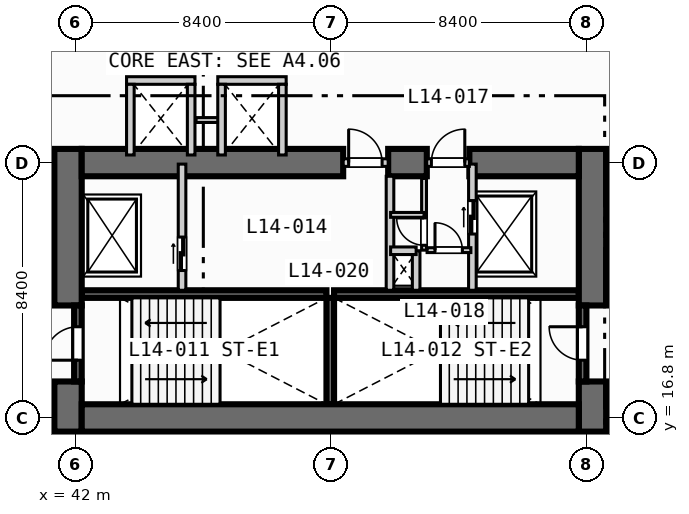
"""IFC4 building model, lengths in metres.
Left out: names, types, materials, properties, quantities, classifications, styles, units other than length and angle.
Written with IfcOpenShell. Run it as: python <this file> out.ifc"""

import sys

from ifc_helpers import new_model, si_unit, direction, frame, frame_2d, origin, place, context, subcontext, project, spatial, rectangle, extrude, element, fill, save


model = new_model("IFC4")
c1 = context("Model", 3, precision=1e-05, world=origin(), true_north=direction((0.0, 1.0)))
c2 = subcontext(c1, "Body", "Model", "MODEL_VIEW")
j1 = project(units=[si_unit("LENGTHUNIT", "METRE"), si_unit("PLANEANGLEUNIT", "RADIAN")], contexts=[c1])
p1 = place(None, origin())
s1 = spatial("IfcSite", under=j1, at=p1, CompositionType="ELEMENT")
p2 = place(p1, origin())
s2 = spatial("IfcBuilding", under=s1, at=p2, CompositionType="ELEMENT")
p3 = place(p2, frame((0.0, 0.0, 62.4)))
s3 = spatial("IfcBuildingStorey", under=s2, at=p3, CompositionType="ELEMENT", Elevation=62.4)
for number, where, z_axis, x_axis in (
    (1, (42.2, 20.875, 0.0), (0.0, 0.0, 1.0), (1.0, 0.0, 0.0)),
    (2, (50.5, 20.875, 0.0), (0.0, 0.0, 1.0), (1.0, 0.0, 0.0)),
):
    element("IfcWall", number, at=place(p3, frame(where, z_axis=z_axis, x_axis=x_axis)), inside=s3, PredefinedType="SOLIDWALL", context=c2, shape_type="SweptSolid", body=[
        extrude(rectangle(XDim=8.05, YDim=0.25, at=frame_2d((4.025, 0.0))), origin(), (0.0, 0.0, 1.0), 3.55),
    ])
p4 = place(p3, frame((50.375, 17.25, 0.0), z_axis=(0.0, 0.0, 1.0), x_axis=(0.0, 1.0, 0.0)))
e3 = element("IfcWall", 3, at=p4, inside=s3, PredefinedType="SOLIDWALL", context=c2, shape_type="SweptSolid", body=[
    extrude(rectangle(XDim=3.5, YDim=0.25, at=frame_2d((1.75, 0.0))), origin(), (0.0, 0.0, 1.0), 3.55),
])
p5 = place(p3, frame((41.75, 16.35, 0.0), z_axis=(0.0, 0.0, 1.0), x_axis=(0.0, 1.0, 0.0)))
e4 = element("IfcWall", 4, at=p5, inside=s3, PredefinedType="SHEAR", context=c2, shape_type="SweptSolid", body=[
    extrude(rectangle(XDim=1.65, YDim=0.9, at=frame_2d((0.825, 0.0))), origin(), (0.0, 0.0, 1.0), 3.55),
])
p6 = place(p3, frame((41.75, 20.5, 0.0), z_axis=(0.0, 0.0, 1.0), x_axis=(0.0, 1.0, 0.0)))
e5 = element("IfcWall", 5, at=p6, inside=s3, PredefinedType="SHEAR", context=c2, shape_type="SweptSolid", body=[
    extrude(rectangle(XDim=5.15, YDim=0.9, at=frame_2d((2.575, 0.0))), origin(), (0.0, 0.0, 1.0), 3.55),
])
p7 = place(p3, frame((59.0, 16.35, 0.0), z_axis=(0.0, 0.0, 1.0), x_axis=(0.0, 1.0, 0.0)))
e6 = element("IfcWall", 6, at=p7, inside=s3, PredefinedType="SHEAR", context=c2, shape_type="SweptSolid", body=[
    extrude(rectangle(XDim=1.65, YDim=0.9, at=frame_2d((0.825, 0.0))), origin(), (0.0, 0.0, 1.0), 3.55),
])
p8 = place(p3, frame((59.0, 20.5, 0.0), z_axis=(0.0, 0.0, 1.0), x_axis=(0.0, 1.0, 0.0)))
e7 = element("IfcWall", 7, at=p8, inside=s3, PredefinedType="SHEAR", context=c2, shape_type="SweptSolid", body=[
    extrude(rectangle(XDim=5.15, YDim=0.9, at=frame_2d((2.575, 0.0))), origin(), (0.0, 0.0, 1.0), 3.55),
])
p9 = place(p3, frame((42.2, 16.8, 0.0), z_axis=(0.0, 0.0, 1.0), x_axis=(1.0, 0.0, 0.0)))
e8 = element("IfcWall", 8, at=p9, inside=s3, PredefinedType="SHEAR", context=c2, shape_type="SweptSolid", body=[
    extrude(rectangle(XDim=16.35, YDim=0.9, at=frame_2d((8.175, 0.0))), origin(), (0.0, 0.0, 1.0), 3.55),
])
p10 = place(p3, frame((42.2, 25.2, 0.0), z_axis=(0.0, 0.0, 1.0), x_axis=(1.0, 0.0, 0.0)))
e9 = element("IfcWall", 9, at=p10, inside=s3, PredefinedType="SHEAR", context=c2, shape_type="SweptSolid", body=[
    extrude(rectangle(XDim=8.6, YDim=0.9, at=frame_2d((4.3, 0.0))), origin(), (0.0, 0.0, 1.0), 3.55),
])
p11 = place(p3, frame((52.28, 25.2, 0.0), z_axis=(0.0, 0.0, 1.0), x_axis=(1.0, 0.0, 0.0)))
e10 = element("IfcWall", 10, at=p11, inside=s3, PredefinedType="SHEAR", context=c2, shape_type="SweptSolid", body=[
    extrude(rectangle(XDim=1.27, YDim=0.9, at=frame_2d((0.635, 0.0))), origin(), (0.0, 0.0, 1.0), 3.55),
])
p12 = place(p3, frame((54.95, 25.2, 0.0), z_axis=(0.0, 0.0, 1.0), x_axis=(1.0, 0.0, 0.0)))
e11 = element("IfcWall", 11, at=p12, inside=s3, PredefinedType="SHEAR", context=c2, shape_type="SweptSolid", body=[
    extrude(rectangle(XDim=3.6, YDim=0.9, at=frame_2d((1.8, 0.0))), origin(), (0.0, 0.0, 1.0), 3.55),
])
p13 = place(p3, frame((42.075, 18.0, 0.0), z_axis=(0.0, 0.0, 1.0), x_axis=(0.0, 1.0, 0.0)))
e12 = element("IfcWall", 12, at=p13, inside=s3, PredefinedType="SOLIDWALL", context=c2, shape_type="SweptSolid", body=[
    extrude(rectangle(XDim=2.5, YDim=0.25, at=frame_2d((1.25, 0.0))), origin(), (0.0, 0.0, 1.0), 3.55),
])
p14 = place(p13, frame((0.7, 0.0, 0.0)))
e13 = element("IfcOpeningElement", 13, at=p14, cuts=e12, PredefinedType="OPENING", context=c2, shape_type="SweptSolid", body=[
    extrude(rectangle(XDim=1.1, YDim=2.15, at=frame_2d((0.55, 1.075))), frame((0.0, 0.135, 0.0), z_axis=(0.0, -1.0, 0.0), x_axis=(1.0, 0.0, 0.0)), (0.0, 0.0, 1.0), 0.27),
])
p15 = place(p3, frame((58.675, 18.0, 0.0), z_axis=(0.0, 0.0, 1.0), x_axis=(0.0, 1.0, 0.0)))
e14 = element("IfcWall", 14, at=p15, inside=s3, PredefinedType="SOLIDWALL", context=c2, shape_type="SweptSolid", body=[
    extrude(rectangle(XDim=2.5, YDim=0.25, at=frame_2d((1.25, 0.0))), origin(), (0.0, 0.0, 1.0), 3.55),
])
p16 = place(p15, frame((0.7, 0.0, 0.0)))
e15 = element("IfcOpeningElement", 15, at=p16, cuts=e14, PredefinedType="OPENING", context=c2, shape_type="SweptSolid", body=[
    extrude(rectangle(XDim=1.1, YDim=2.15, at=frame_2d((0.55, 1.075))), frame((0.0, 0.135, 0.0), z_axis=(0.0, -1.0, 0.0), x_axis=(1.0, 0.0, 0.0)), (0.0, 0.0, 1.0), 0.27),
])
p17 = place(p3, frame((45.5, 21.0, 0.0), z_axis=(0.0, 0.0, 1.0), x_axis=(0.0, 1.0, 0.0)))
e16 = element("IfcWall", 16, at=p17, inside=s3, PredefinedType="SOLIDWALL", context=c2, shape_type="SweptSolid", body=[
    extrude(rectangle(XDim=4.15, YDim=0.25, at=frame_2d((2.075, 0.0))), origin(), (0.0, 0.0, 1.0), 3.55),
])
p18 = place(p17, frame((0.65, 0.0, 0.0)))
e17 = element("IfcOpeningElement", 17, at=p18, cuts=e16, PredefinedType="OPENING", context=c2, shape_type="SweptSolid", body=[
    extrude(rectangle(XDim=1.1, YDim=2.15, at=frame_2d((0.55, 1.075))), frame((0.0, 0.135, 0.0), z_axis=(0.0, -1.0, 0.0), x_axis=(1.0, 0.0, 0.0)), (0.0, 0.0, 1.0), 0.27),
])
p19 = place(p3, frame((50.8, 25.2, 0.0), z_axis=(0.0, 0.0, 1.0), x_axis=(1.0, 0.0, 0.0)))
e18 = element("IfcWall", 18, at=p19, inside=s3, PredefinedType="SOLIDWALL", context=c2, shape_type="SweptSolid", body=[
    extrude(rectangle(XDim=1.48, YDim=0.25, at=frame_2d((0.74, 0.0))), origin(), (0.0, 0.0, 1.0), 3.55),
])
p20 = place(p19, frame((0.18, 0.0, 0.0)))
e19 = element("IfcOpeningElement", 19, at=p20, cuts=e18, PredefinedType="OPENING", context=c2, shape_type="SweptSolid", body=[
    extrude(rectangle(XDim=1.1, YDim=2.15, at=frame_2d((0.55, 1.075))), frame((0.0, 0.135, 0.0), z_axis=(0.0, -1.0, 0.0), x_axis=(1.0, 0.0, 0.0)), (0.0, 0.0, 1.0), 0.27),
])
p21 = place(p3, frame((52.34, 21.0, 0.0), z_axis=(0.0, 0.0, 1.0), x_axis=(0.0, 1.0, 0.0)))
e20 = element("IfcWall", 20, at=p21, inside=s3, PredefinedType="SOLIDWALL", context=c2, shape_type="SweptSolid", body=[
    extrude(rectangle(XDim=3.75, YDim=0.25, at=frame_2d((1.875, 0.0))), origin(), (0.0, 0.0, 1.0), 3.55),
])
p22 = place(p3, frame((55.05, 21.0, 0.0), z_axis=(0.0, 0.0, 1.0), x_axis=(0.0, 1.0, 0.0)))
e21 = element("IfcWall", 21, at=p22, inside=s3, PredefinedType="SOLIDWALL", context=c2, shape_type="SweptSolid", body=[
    extrude(rectangle(XDim=4.15, YDim=0.25, at=frame_2d((2.075, 0.0))), origin(), (0.0, 0.0, 1.0), 3.55),
])
p23 = place(p22, frame((1.85, 0.0, 0.0)))
e22 = element("IfcOpeningElement", 22, at=p23, cuts=e21, PredefinedType="OPENING", context=c2, shape_type="SweptSolid", body=[
    extrude(rectangle(XDim=1.1, YDim=2.15, at=frame_2d((0.55, 1.075))), frame((0.0, 0.135, 0.0), z_axis=(0.0, -1.0, 0.0), x_axis=(1.0, 0.0, 0.0)), (0.0, 0.0, 1.0), 0.27),
])
p24 = place(p3, frame((53.55, 25.2, 0.0), z_axis=(0.0, 0.0, 1.0), x_axis=(1.0, 0.0, 0.0)))
e23 = element("IfcWall", 23, at=p24, inside=s3, PredefinedType="SOLIDWALL", context=c2, shape_type="SweptSolid", body=[
    extrude(rectangle(XDim=1.4, YDim=0.25, at=frame_2d((0.7, 0.0))), origin(), (0.0, 0.0, 1.0), 3.55),
])
p25 = place(p24, frame((0.15, 0.0, 0.0)))
e24 = element("IfcOpeningElement", 24, at=p25, cuts=e23, PredefinedType="OPENING", context=c2, shape_type="SweptSolid", body=[
    extrude(rectangle(XDim=1.1, YDim=2.15, at=frame_2d((0.55, 1.075))), frame((0.0, 0.135, 0.0), z_axis=(0.0, -1.0, 0.0), x_axis=(1.0, 0.0, 0.0)), (0.0, 0.0, 1.0), 0.27),
])
p26 = place(p3, frame((53.2, 21.0, 0.0), z_axis=(0.0, 0.0, 1.0), x_axis=(0.0, 1.0, 0.0)))
e25 = element("IfcWall", 25, at=p26, inside=s3, PredefinedType="SOLIDWALL", context=c2, shape_type="SweptSolid", body=[
    extrude(rectangle(XDim=1.3, YDim=0.25, at=frame_2d((0.65, 0.0))), origin(), (0.0, 0.0, 1.0), 3.55),
])
p27 = place(p3, frame((52.36, 22.3, 0.0), z_axis=(0.0, 0.0, 1.0), x_axis=(1.0, 0.0, 0.0)))
e26 = element("IfcWall", 26, at=p27, inside=s3, PredefinedType="SOLIDWALL", context=c2, shape_type="SweptSolid", body=[
    extrude(rectangle(XDim=0.84, YDim=0.25, at=frame_2d((0.42, 0.0))), origin(), (0.0, 0.0, 1.0), 3.55),
])
p28 = place(p3, frame((53.56, 22.32, 0.0), z_axis=(0.0, 0.0, 1.0), x_axis=(1.0, 0.0, 0.0)))
e27 = element("IfcWall", 27, at=p28, inside=s3, PredefinedType="PARTITIONING", context=c2, shape_type="SweptSolid", body=[
    extrude(rectangle(XDim=1.44, YDim=0.16, at=frame_2d((0.72, 0.0))), origin(), (0.0, 0.0, 1.0), 3.55),
])
p29 = place(p28, frame((0.26, 0.0, 0.0)))
e28 = element("IfcOpeningElement", 28, at=p29, cuts=e27, PredefinedType="OPENING", context=c2, shape_type="SweptSolid", body=[
    extrude(rectangle(XDim=0.9, YDim=2.1, at=frame_2d((0.45, 1.05))), frame((0.0, 0.09, 0.0), z_axis=(0.0, -1.0, 0.0), x_axis=(1.0, 0.0, 0.0)), (0.0, 0.0, 1.0), 0.18),
])
p30 = place(p3, frame((53.46, 22.32, 0.0), z_axis=(0.0, 0.0, 1.0), x_axis=(0.0, 1.0, 0.0)))
e29 = element("IfcWall", 29, at=p30, inside=s3, PredefinedType="PARTITIONING", context=c2, shape_type="SweptSolid", body=[
    extrude(rectangle(XDim=2.36, YDim=0.16, at=frame_2d((1.18, 0.0))), origin(), (0.0, 0.0, 1.0), 3.55),
])
p31 = place(p30, frame((0.16, 0.0, 0.0)))
e30 = element("IfcOpeningElement", 30, at=p31, cuts=e29, PredefinedType="OPENING", context=c2, shape_type="SweptSolid", body=[
    extrude(rectangle(XDim=0.9, YDim=2.1, at=frame_2d((0.45, 1.05))), frame((0.0, 0.09, 0.0), z_axis=(0.0, -1.0, 0.0), x_axis=(1.0, 0.0, 0.0)), (0.0, 0.0, 1.0), 0.18),
])
p32 = place(p3, frame((52.36, 23.48, 0.0), z_axis=(0.0, 0.0, 1.0), x_axis=(1.0, 0.0, 0.0)))
e31 = element("IfcWall", 31, at=p32, inside=s3, PredefinedType="PARTITIONING", context=c2, shape_type="SweptSolid", body=[
    extrude(rectangle(XDim=1.1, YDim=0.16, at=frame_2d((0.55, 0.0))), origin(), (0.0, 0.0, 1.0), 3.55),
])
p33 = place(p3, frame((43.675, 27.9, 0.0), z_axis=(0.0, 0.0, 1.0), x_axis=(1.0, 0.0, 0.0)))
e32 = element("IfcWall", 32, at=p33, inside=s3, PredefinedType="SOLIDWALL", context=c2, shape_type="SweptSolid", body=[
    extrude(rectangle(XDim=2.25, YDim=0.25, at=frame_2d((1.125, 0.0))), origin(), (0.0, 0.0, 1.0), 3.55),
])
for number, where, z_axis, x_axis in (
    (33, (43.8, 25.45, 0.0), (0.0, 0.0, 1.0), (0.0, 1.0, 0.0)),
    (34, (45.8, 25.45, 0.0), (0.0, 0.0, 1.0), (0.0, 1.0, 0.0)),
):
    element("IfcWall", number, at=place(p3, frame(where, z_axis=z_axis, x_axis=x_axis)), inside=s3, PredefinedType="SOLIDWALL", context=c2, shape_type="SweptSolid", body=[
        extrude(rectangle(XDim=2.325, YDim=0.25, at=frame_2d((1.163, 0.0))), origin(), (0.0, 0.0, 1.0), 3.55),
    ])
p34 = place(p3, frame((45.96, 26.6, 0.0), z_axis=(0.0, 0.0, 1.0), x_axis=(1.0, 0.0, 0.0)))
e35 = element("IfcWall", 35, at=p34, inside=s3, PredefinedType="PARTITIONING", context=c2, shape_type="SweptSolid", body=[
    extrude(rectangle(XDim=0.88, YDim=0.16, at=frame_2d((0.44, 0.0))), origin(), (0.0, 0.0, 1.0), 3.55),
])
p35 = place(p3, frame((46.675, 27.9, 0.0), z_axis=(0.0, 0.0, 1.0), x_axis=(1.0, 0.0, 0.0)))
e36 = element("IfcWall", 36, at=p35, inside=s3, PredefinedType="SOLIDWALL", context=c2, shape_type="SweptSolid", body=[
    extrude(rectangle(XDim=2.25, YDim=0.25, at=frame_2d((1.125, 0.0))), origin(), (0.0, 0.0, 1.0), 3.55),
])
for number, where, z_axis, x_axis in (
    (37, (46.8, 25.45, 0.0), (0.0, 0.0, 1.0), (0.0, 1.0, 0.0)),
    (38, (48.8, 25.45, 0.0), (0.0, 0.0, 1.0), (0.0, 1.0, 0.0)),
):
    element("IfcWall", number, at=place(p3, frame(where, z_axis=z_axis, x_axis=x_axis)), inside=s3, PredefinedType="SOLIDWALL", context=c2, shape_type="SweptSolid", body=[
        extrude(rectangle(XDim=2.325, YDim=0.25, at=frame_2d((1.163, 0.0))), origin(), (0.0, 0.0, 1.0), 3.55),
    ])
p36 = place(p14, origin())
e39 = element("IfcDoor", 39, at=p36, inside=s3, OperationType="SINGLE_SWING_LEFT", PredefinedType="DOOR", context=c2, shape_type="SweptSolid", body=[
    extrude(rectangle(XDim=1.1, YDim=2.15, at=frame_2d((0.55, 1.075))), frame((0.0, 0.025, 0.0), z_axis=(0.0, -1.0, 0.0), x_axis=(1.0, 0.0, 0.0)), (0.0, 0.0, 1.0), 0.05),
])
fill(e13, e39)
p37 = place(p16, origin())
e40 = element("IfcDoor", 40, at=p37, inside=s3, OperationType="SINGLE_SWING_RIGHT", PredefinedType="DOOR", context=c2, shape_type="SweptSolid", body=[
    extrude(rectangle(XDim=1.1, YDim=2.15, at=frame_2d((0.55, 1.075))), frame((0.0, 0.025, 0.0), z_axis=(0.0, -1.0, 0.0), x_axis=(1.0, 0.0, 0.0)), (0.0, 0.0, 1.0), 0.05),
])
fill(e15, e40)
p38 = place(p18, origin())
e41 = element("IfcDoor", 41, at=p38, inside=s3, OperationType="SLIDING_TO_LEFT", PredefinedType="DOOR", context=c2, shape_type="SweptSolid", body=[
    extrude(rectangle(XDim=1.1, YDim=2.15, at=frame_2d((0.55, 1.075))), frame((0.0, 0.025, 0.0), z_axis=(0.0, -1.0, 0.0), x_axis=(1.0, 0.0, 0.0)), (0.0, 0.0, 1.0), 0.05),
])
fill(e17, e41)
p39 = place(p20, origin())
e42 = element("IfcDoor", 42, at=p39, inside=s3, OperationType="SINGLE_SWING_LEFT", PredefinedType="DOOR", context=c2, shape_type="SweptSolid", body=[
    extrude(rectangle(XDim=1.1, YDim=2.15, at=frame_2d((0.55, 1.075))), frame((0.0, 0.025, 0.0), z_axis=(0.0, -1.0, 0.0), x_axis=(1.0, 0.0, 0.0)), (0.0, 0.0, 1.0), 0.05),
])
fill(e19, e42)
p40 = place(p23, origin())
e43 = element("IfcDoor", 43, at=p40, inside=s3, OperationType="SLIDING_TO_LEFT", PredefinedType="DOOR", context=c2, shape_type="SweptSolid", body=[
    extrude(rectangle(XDim=1.1, YDim=2.15, at=frame_2d((0.55, 1.075))), frame((0.0, 0.025, 0.0), z_axis=(0.0, -1.0, 0.0), x_axis=(1.0, 0.0, 0.0)), (0.0, 0.0, 1.0), 0.05),
])
fill(e22, e43)
p41 = place(p25, origin())
e44 = element("IfcDoor", 44, at=p41, inside=s3, OperationType="SINGLE_SWING_RIGHT", PredefinedType="DOOR", context=c2, shape_type="SweptSolid", body=[
    extrude(rectangle(XDim=1.1, YDim=2.15, at=frame_2d((0.55, 1.075))), frame((0.0, 0.025, 0.0), z_axis=(0.0, -1.0, 0.0), x_axis=(1.0, 0.0, 0.0)), (0.0, 0.0, 1.0), 0.05),
])
fill(e24, e44)
p42 = place(p29, origin())
e45 = element("IfcDoor", 45, at=p42, inside=s3, OperationType="SINGLE_SWING_LEFT", PredefinedType="DOOR", context=c2, shape_type="SweptSolid", body=[
    extrude(rectangle(XDim=0.9, YDim=2.1, at=frame_2d((0.45, 1.05))), frame((0.0, 0.025, 0.0), z_axis=(0.0, -1.0, 0.0), x_axis=(1.0, 0.0, 0.0)), (0.0, 0.0, 1.0), 0.05),
])
fill(e28, e45)
p43 = place(p31, origin())
e46 = element("IfcDoor", 46, at=p43, inside=s3, OperationType="SINGLE_SWING_RIGHT", PredefinedType="DOOR", context=c2, shape_type="SweptSolid", body=[
    extrude(rectangle(XDim=0.9, YDim=2.1, at=frame_2d((0.45, 1.05))), frame((0.0, 0.025, 0.0), z_axis=(0.0, -1.0, 0.0), x_axis=(1.0, 0.0, 0.0)), (0.0, 0.0, 1.0), 0.05),
])
fill(e30, e46)
save(model, sys.argv[1])
